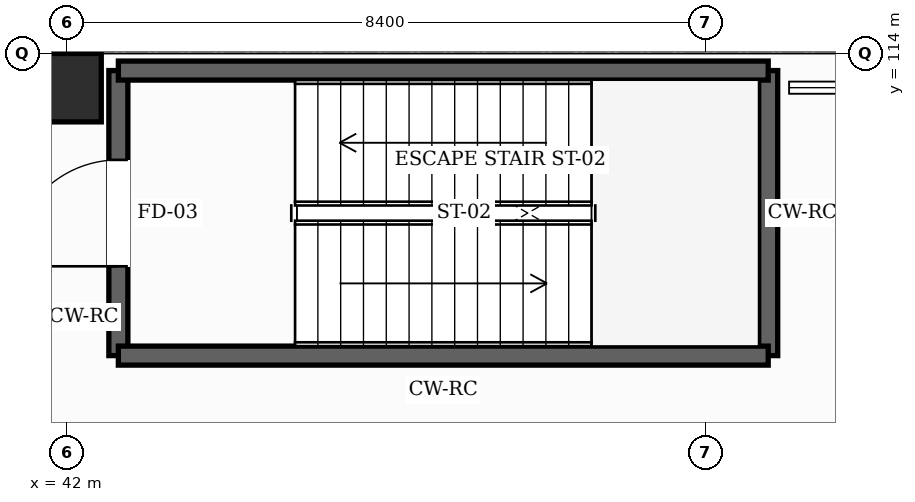
"""IFC4 building model, lengths in metres.
Left out: names, types, materials, properties, quantities, classifications, styles, units other than length and angle.
Written with IfcOpenShell. Run it as: python <this file> out.ifc"""

import sys

from ifc_helpers import new_model, si_unit, direction, frame, frame_2d, origin, origin_2d, place, context, subcontext, project, spatial, rectangle, hollow_rectangle, extrude, element, fill, save


model = new_model("IFC4")
c1 = context("Model", 3, precision=1e-05, world=origin(), true_north=direction((0.0, 1.0)))
c2 = subcontext(c1, "Body", "Model", "MODEL_VIEW")
j1 = project(units=[si_unit("LENGTHUNIT", "METRE"), si_unit("PLANEANGLEUNIT", "RADIAN")], contexts=[c1])
p1 = place(None, origin())
s1 = spatial("IfcSite", under=j1, at=p1, CompositionType="ELEMENT")
p2 = place(p1, origin())
s2 = spatial("IfcBuilding", under=s1, at=p2, CompositionType="ELEMENT")
p3 = place(p2, frame((0.0, 0.0, 5.4)))
s3 = spatial("IfcBuildingStorey", under=s2, at=p3, CompositionType="ELEMENT", Elevation=5.4)
p4 = place(p3, frame((42.0, 113.55, 0.0), z_axis=(0.0, 0.0, 1.0), x_axis=(1.0, 0.0, 0.0)))
e1 = element("IfcColumn", 1, at=p4, inside=s3, PredefinedType="COLUMN", context=c2, shape_type="SweptSolid", body=[
    extrude(hollow_rectangle(XDim=0.9, YDim=0.9, WallThickness=0.032, InnerFilletRadius=0.032, OuterFilletRadius=0.064, at=origin_2d()), origin(), (0.0, 0.0, 1.0), 4.8),
])
p5 = place(p3, frame((42.675, 110.025, 0.0), z_axis=(0.0, 0.0, 1.0), x_axis=(0.0, 1.0, 0.0)))
e2 = element("IfcWall", 2, at=p5, inside=s3, PredefinedType="SHEAR", context=c2, shape_type="SweptSolid", body=[
    extrude(rectangle(XDim=3.75, YDim=0.25, at=frame_2d((1.875, 0.0))), origin(), (0.0, 0.0, 1.0), 4.55),
])
p6 = place(p5, frame((1.175, 0.0, 0.0)))
e3 = element("IfcOpeningElement", 3, at=p6, cuts=e2, PredefinedType="OPENING", context=c2, shape_type="SweptSolid", body=[
    extrude(rectangle(XDim=1.4, YDim=2.25, at=frame_2d((0.7, 1.125))), frame((0.0, 0.135, 0.0), z_axis=(0.0, -1.0, 0.0), x_axis=(1.0, 0.0, 0.0)), (0.0, 0.0, 1.0), 0.27),
])
p7 = place(p3, frame((51.225, 113.775, 0.0), z_axis=(0.0, 0.0, 1.0), x_axis=(0.0, -1.0, 0.0)))
e4 = element("IfcWall", 4, at=p7, inside=s3, PredefinedType="SHEAR", context=c2, shape_type="SweptSolid", body=[
    extrude(rectangle(XDim=3.75, YDim=0.25, at=frame_2d((1.875, 0.0))), origin(), (0.0, 0.0, 1.0), 4.55),
])
for number, where, z_axis, x_axis in (
    (5, (51.225, 110.025, 0.0), (0.0, 0.0, 1.0), (-1.0, 0.0, 0.0)),
    (6, (42.675, 113.775, 0.0), (0.0, 0.0, 1.0), (1.0, 0.0, 0.0)),
):
    element("IfcWall", number, at=place(p3, frame(where, z_axis=z_axis, x_axis=x_axis)), inside=s3, PredefinedType="SHEAR", context=c2, shape_type="SweptSolid", body=[
        extrude(rectangle(XDim=8.55, YDim=0.25, at=frame_2d((4.275, 0.0))), origin(), (0.0, 0.0, 1.0), 4.55),
    ])
p8 = place(p6, origin())
e7 = element("IfcDoor", 7, at=p8, inside=s3, OperationType="SINGLE_SWING_LEFT", PredefinedType="DOOR", context=c2, shape_type="SweptSolid", body=[
    extrude(rectangle(XDim=1.4, YDim=2.25, at=frame_2d((0.7, 1.125))), frame((0.0, 0.025, 0.0), z_axis=(0.0, -1.0, 0.0), x_axis=(1.0, 0.0, 0.0)), (0.0, 0.0, 1.0), 0.05),
])
fill(e3, e7)
save(model, sys.argv[1])
